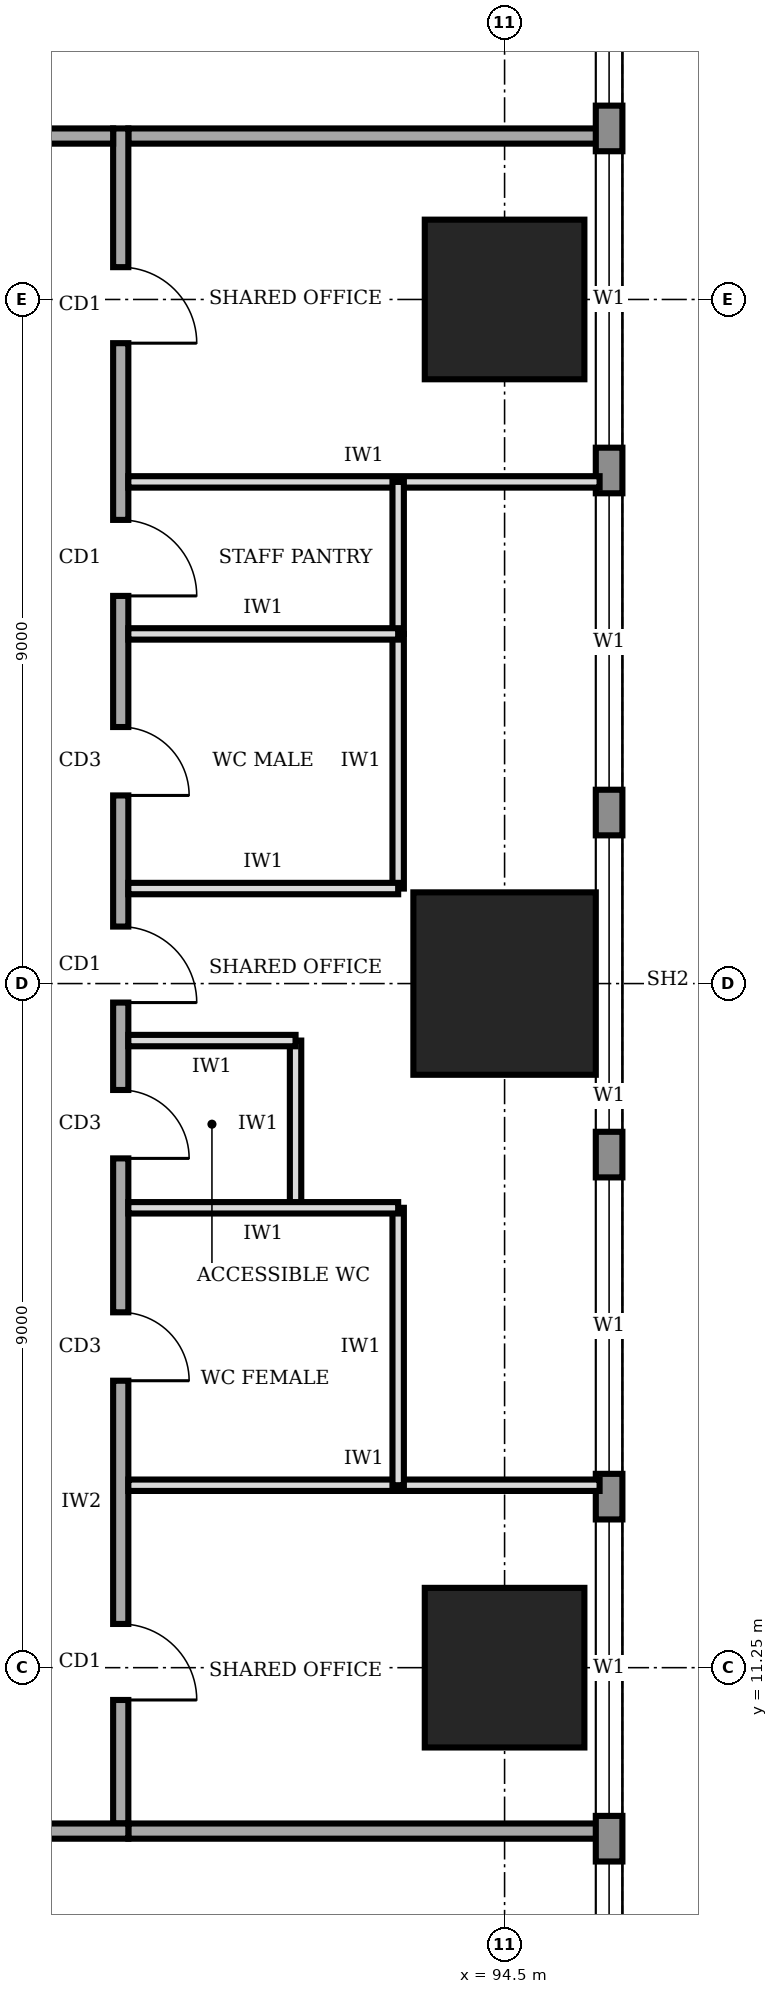
"""IFC4 building model, lengths in metres.
Left out: names, types, materials, properties, quantities, classifications, styles, units other than length and angle.
Written with IfcOpenShell. Run it as: python <this file> out.ifc"""

import sys

from ifc_helpers import new_model, si_unit, direction, frame, frame_2d, origin, origin_2d, place, context, subcontext, project, spatial, rectangle, extrude, element, fill, save


model = new_model("IFC4")
c1 = context("Model", 3, precision=1e-05, world=origin(), true_north=direction((0.0, 1.0)))
c2 = subcontext(c1, "Body", "Model", "MODEL_VIEW")
j1 = project(units=[si_unit("LENGTHUNIT", "METRE"), si_unit("PLANEANGLEUNIT", "RADIAN")], contexts=[c1])
p1 = place(None, origin())
s1 = spatial("IfcSite", under=j1, at=p1, CompositionType="ELEMENT")
p2 = place(p1, origin())
s2 = spatial("IfcBuilding", under=s1, at=p2, CompositionType="ELEMENT")
p3 = place(p2, frame((0.0, 0.0, 125.0)))
s3 = spatial("IfcBuildingStorey", under=s2, at=p3, CompositionType="ELEMENT", Elevation=125.0)
p4 = place(p3, frame((94.5, 11.25, 0.0), z_axis=(0.0, 0.0, 1.0), x_axis=(1.0, 0.0, 0.0)))
e1 = element("IfcColumn", 1, at=p4, inside=s3, PredefinedType="COLUMN", context=c2, shape_type="SweptSolid", body=[
    extrude(rectangle(XDim=2.1, YDim=2.1, at=origin_2d()), origin(), (0.0, 0.0, 1.0), 4.0),
])
p5 = place(p3, frame((94.5, 20.25, 0.0), z_axis=(0.0, 0.0, 1.0), x_axis=(1.0, 0.0, 0.0)))
e2 = element("IfcColumn", 2, at=p5, inside=s3, PredefinedType="COLUMN", context=c2, shape_type="SweptSolid", body=[
    extrude(rectangle(XDim=2.4, YDim=2.4, at=origin_2d()), origin(), (0.0, 0.0, 1.0), 4.0),
])
p6 = place(p3, frame((94.5, 29.25, 0.0), z_axis=(0.0, 0.0, 1.0), x_axis=(1.0, 0.0, 0.0)))
e3 = element("IfcColumn", 3, at=p6, inside=s3, PredefinedType="COLUMN", context=c2, shape_type="SweptSolid", body=[
    extrude(rectangle(XDim=2.1, YDim=2.1, at=origin_2d()), origin(), (0.0, 0.0, 1.0), 4.0),
])
p7 = place(p3, frame((95.875, 3.32, 0.0), z_axis=(0.0, 0.0, 1.0), x_axis=(0.0, 1.0, 0.0)))
e4 = element("IfcWall", 4, at=p7, inside=s3, PredefinedType="STANDARD", context=c2, shape_type="SweptSolid", body=[
    extrude(rectangle(XDim=33.96, YDim=0.35, at=frame_2d((16.98, 0.0))), origin(), (0.0, 0.0, 1.0), 3.75),
])
p8 = place(p7, frame((1.48, 0.0, 0.9)))
e5 = element("IfcOpeningElement", 5, at=p8, cuts=e4, PredefinedType="OPENING", context=c2, shape_type="SweptSolid", body=[
    extrude(rectangle(XDim=3.9, YDim=2.2, at=frame_2d((1.95, 1.1))), frame((0.0, 0.185, 0.0), z_axis=(0.0, -1.0, 0.0), x_axis=(1.0, 0.0, 0.0)), (0.0, 0.0, 1.0), 0.37),
])
p9 = place(p7, frame((5.98, 0.0, 0.9)))
e6 = element("IfcOpeningElement", 6, at=p9, cuts=e4, PredefinedType="OPENING", context=c2, shape_type="SweptSolid", body=[
    extrude(rectangle(XDim=3.9, YDim=2.2, at=frame_2d((1.95, 1.1))), frame((0.0, 0.185, 0.0), z_axis=(0.0, -1.0, 0.0), x_axis=(1.0, 0.0, 0.0)), (0.0, 0.0, 1.0), 0.37),
])
p10 = place(p7, frame((10.48, 0.0, 0.9)))
e7 = element("IfcOpeningElement", 7, at=p10, cuts=e4, PredefinedType="OPENING", context=c2, shape_type="SweptSolid", body=[
    extrude(rectangle(XDim=3.9, YDim=2.2, at=frame_2d((1.95, 1.1))), frame((0.0, 0.185, 0.0), z_axis=(0.0, -1.0, 0.0), x_axis=(1.0, 0.0, 0.0)), (0.0, 0.0, 1.0), 0.37),
])
p11 = place(p7, frame((14.98, 0.0, 0.9)))
e8 = element("IfcOpeningElement", 8, at=p11, cuts=e4, PredefinedType="OPENING", context=c2, shape_type="SweptSolid", body=[
    extrude(rectangle(XDim=3.9, YDim=2.2, at=frame_2d((1.95, 1.1))), frame((0.0, 0.185, 0.0), z_axis=(0.0, -1.0, 0.0), x_axis=(1.0, 0.0, 0.0)), (0.0, 0.0, 1.0), 0.37),
])
p12 = place(p7, frame((19.48, 0.0, 0.9)))
e9 = element("IfcOpeningElement", 9, at=p12, cuts=e4, PredefinedType="OPENING", context=c2, shape_type="SweptSolid", body=[
    extrude(rectangle(XDim=3.9, YDim=2.2, at=frame_2d((1.95, 1.1))), frame((0.0, 0.185, 0.0), z_axis=(0.0, -1.0, 0.0), x_axis=(1.0, 0.0, 0.0)), (0.0, 0.0, 1.0), 0.37),
])
p13 = place(p7, frame((23.98, 0.0, 0.9)))
e10 = element("IfcOpeningElement", 10, at=p13, cuts=e4, PredefinedType="OPENING", context=c2, shape_type="SweptSolid", body=[
    extrude(rectangle(XDim=3.9, YDim=2.2, at=frame_2d((1.95, 1.1))), frame((0.0, 0.185, 0.0), z_axis=(0.0, -1.0, 0.0), x_axis=(1.0, 0.0, 0.0)), (0.0, 0.0, 1.0), 0.37),
])
p14 = place(p7, frame((28.48, 0.0, 0.9)))
e11 = element("IfcOpeningElement", 11, at=p14, cuts=e4, PredefinedType="OPENING", context=c2, shape_type="SweptSolid", body=[
    extrude(rectangle(XDim=3.9, YDim=2.2, at=frame_2d((1.95, 1.1))), frame((0.0, 0.185, 0.0), z_axis=(0.0, -1.0, 0.0), x_axis=(1.0, 0.0, 0.0)), (0.0, 0.0, 1.0), 0.37),
])
p15 = place(p3, frame((71.15, 9.1, 0.0), z_axis=(0.0, 0.0, 1.0), x_axis=(1.0, 0.0, 0.0)))
e12 = element("IfcWall", 12, at=p15, inside=s3, PredefinedType="SOLIDWALL", context=c2, shape_type="SweptSolid", body=[
    extrude(rectangle(XDim=18.4, YDim=0.2, at=frame_2d((9.2, 0.0))), origin(), (0.0, 0.0, 1.0), 3.75),
])
p16 = place(p15, frame((2.075, 0.0, 0.0)))
e13 = element("IfcOpeningElement", 13, at=p16, cuts=e12, PredefinedType="OPENING", context=c2, shape_type="SweptSolid", body=[
    extrude(rectangle(XDim=1.0, YDim=2.1, at=frame_2d((0.5, 1.05))), frame((0.0, 0.11, 0.0), z_axis=(0.0, -1.0, 0.0), x_axis=(1.0, 0.0, 0.0)), (0.0, 0.0, 1.0), 0.22),
])
p17 = place(p15, frame((9.35, 0.0, 0.0)))
e14 = element("IfcOpeningElement", 14, at=p17, cuts=e12, PredefinedType="OPENING", context=c2, shape_type="SweptSolid", body=[
    extrude(rectangle(XDim=1.0, YDim=2.1, at=frame_2d((0.5, 1.05))), frame((0.0, 0.11, 0.0), z_axis=(0.0, -1.0, 0.0), x_axis=(1.0, 0.0, 0.0)), (0.0, 0.0, 1.0), 0.22),
])
p18 = place(p15, frame((15.875, 0.0, 0.0)))
e15 = element("IfcOpeningElement", 15, at=p18, cuts=e12, PredefinedType="OPENING", context=c2, shape_type="SweptSolid", body=[
    extrude(rectangle(XDim=1.0, YDim=2.1, at=frame_2d((0.5, 1.05))), frame((0.0, 0.11, 0.0), z_axis=(0.0, -1.0, 0.0), x_axis=(1.0, 0.0, 0.0)), (0.0, 0.0, 1.0), 0.22),
])
p19 = place(p3, frame((89.45, 9.2, 0.0), z_axis=(0.0, 0.0, 1.0), x_axis=(0.0, 1.0, 0.0)))
e16 = element("IfcWall", 16, at=p19, inside=s3, PredefinedType="SOLIDWALL", context=c2, shape_type="SweptSolid", body=[
    extrude(rectangle(XDim=22.3, YDim=0.2, at=frame_2d((11.15, 0.0))), origin(), (0.0, 0.0, 1.0), 3.75),
])
p20 = place(p19, frame((1.625, 0.0, 0.0)))
e17 = element("IfcOpeningElement", 17, at=p20, cuts=e16, PredefinedType="OPENING", context=c2, shape_type="SweptSolid", body=[
    extrude(rectangle(XDim=1.0, YDim=2.1, at=frame_2d((0.5, 1.05))), frame((0.0, 0.11, 0.0), z_axis=(0.0, -1.0, 0.0), x_axis=(1.0, 0.0, 0.0)), (0.0, 0.0, 1.0), 0.22),
])
p21 = place(p19, frame((5.825, 0.0, 0.0)))
e18 = element("IfcOpeningElement", 18, at=p21, cuts=e16, PredefinedType="OPENING", context=c2, shape_type="SweptSolid", body=[
    extrude(rectangle(XDim=0.9, YDim=2.1, at=frame_2d((0.45, 1.05))), frame((0.0, 0.11, 0.0), z_axis=(0.0, -1.0, 0.0), x_axis=(1.0, 0.0, 0.0)), (0.0, 0.0, 1.0), 0.22),
])
p22 = place(p19, frame((8.75, 0.0, 0.0)))
e19 = element("IfcOpeningElement", 19, at=p22, cuts=e16, PredefinedType="OPENING", context=c2, shape_type="SweptSolid", body=[
    extrude(rectangle(XDim=0.9, YDim=2.1, at=frame_2d((0.45, 1.05))), frame((0.0, 0.11, 0.0), z_axis=(0.0, -1.0, 0.0), x_axis=(1.0, 0.0, 0.0)), (0.0, 0.0, 1.0), 0.22),
])
p23 = place(p19, frame((13.525, 0.0, 0.0)))
e20 = element("IfcOpeningElement", 20, at=p23, cuts=e16, PredefinedType="OPENING", context=c2, shape_type="SweptSolid", body=[
    extrude(rectangle(XDim=0.9, YDim=2.1, at=frame_2d((0.45, 1.05))), frame((0.0, 0.11, 0.0), z_axis=(0.0, -1.0, 0.0), x_axis=(1.0, 0.0, 0.0)), (0.0, 0.0, 1.0), 0.22),
])
p24 = place(p19, frame((16.15, 0.0, 0.0)))
e21 = element("IfcOpeningElement", 21, at=p24, cuts=e16, PredefinedType="OPENING", context=c2, shape_type="SweptSolid", body=[
    extrude(rectangle(XDim=1.0, YDim=2.1, at=frame_2d((0.5, 1.05))), frame((0.0, 0.11, 0.0), z_axis=(0.0, -1.0, 0.0), x_axis=(1.0, 0.0, 0.0)), (0.0, 0.0, 1.0), 0.22),
])
p25 = place(p19, frame((10.8, 0.0, 0.0)))
e22 = element("IfcOpeningElement", 22, at=p25, cuts=e16, PredefinedType="OPENING", context=c2, shape_type="SweptSolid", body=[
    extrude(rectangle(XDim=1.0, YDim=2.1, at=frame_2d((0.5, 1.05))), frame((0.0, 0.11, 0.0), z_axis=(0.0, -1.0, 0.0), x_axis=(1.0, 0.0, 0.0)), (0.0, 0.0, 1.0), 0.22),
])
p26 = place(p19, frame((19.475, 0.0, 0.0)))
e23 = element("IfcOpeningElement", 23, at=p26, cuts=e16, PredefinedType="OPENING", context=c2, shape_type="SweptSolid", body=[
    extrude(rectangle(XDim=1.0, YDim=2.1, at=frame_2d((0.5, 1.05))), frame((0.0, 0.11, 0.0), z_axis=(0.0, -1.0, 0.0), x_axis=(1.0, 0.0, 0.0)), (0.0, 0.0, 1.0), 0.22),
])
p27 = place(p3, frame((89.35, 31.4, 0.0), z_axis=(0.0, 0.0, 1.0), x_axis=(-1.0, 0.0, 0.0)))
e24 = element("IfcWall", 24, at=p27, inside=s3, PredefinedType="SOLIDWALL", context=c2, shape_type="SweptSolid", body=[
    extrude(rectangle(XDim=18.4, YDim=0.2, at=frame_2d((9.2, 0.0))), origin(), (0.0, 0.0, 1.0), 3.75),
])
p28 = place(p27, frame((14.725, 0.0, 0.0)))
e25 = element("IfcOpeningElement", 25, at=p28, cuts=e24, PredefinedType="OPENING", context=c2, shape_type="SweptSolid", body=[
    extrude(rectangle(XDim=1.8, YDim=2.1, at=frame_2d((0.9, 1.05))), frame((0.0, 0.11, 0.0), z_axis=(0.0, -1.0, 0.0), x_axis=(1.0, 0.0, 0.0)), (0.0, 0.0, 1.0), 0.22),
])
p29 = place(p27, frame((7.85, 0.0, 0.0)))
e26 = element("IfcOpeningElement", 26, at=p29, cuts=e24, PredefinedType="OPENING", context=c2, shape_type="SweptSolid", body=[
    extrude(rectangle(XDim=1.0, YDim=2.1, at=frame_2d((0.5, 1.05))), frame((0.0, 0.11, 0.0), z_axis=(0.0, -1.0, 0.0), x_axis=(1.0, 0.0, 0.0)), (0.0, 0.0, 1.0), 0.22),
])
p30 = place(p27, frame((1.325, 0.0, 0.0)))
e27 = element("IfcOpeningElement", 27, at=p30, cuts=e24, PredefinedType="OPENING", context=c2, shape_type="SweptSolid", body=[
    extrude(rectangle(XDim=1.0, YDim=2.1, at=frame_2d((0.5, 1.05))), frame((0.0, 0.11, 0.0), z_axis=(0.0, -1.0, 0.0), x_axis=(1.0, 0.0, 0.0)), (0.0, 0.0, 1.0), 0.22),
])
for number, where, z_axis, x_axis in (
    (28, (89.55, 9.1, 0.0), (0.0, 0.0, 1.0), (1.0, 0.0, 0.0)),
    (29, (89.55, 31.4, 0.0), (0.0, 0.0, 1.0), (1.0, 0.0, 0.0)),
):
    element("IfcWall", number, at=place(p3, frame(where, z_axis=z_axis, x_axis=x_axis)), inside=s3, PredefinedType="SOLIDWALL", context=c2, shape_type="SweptSolid", body=[
        extrude(rectangle(XDim=6.2, YDim=0.2, at=frame_2d((3.1, 0.0))), origin(), (0.0, 0.0, 1.0), 3.75),
    ])
for number, where, z_axis, x_axis in (
    (30, (89.55, 13.65, 0.0), (0.0, 0.0, 1.0), (1.0, 0.0, 0.0)),
    (31, (89.55, 26.85, 0.0), (0.0, 0.0, 1.0), (1.0, 0.0, 0.0)),
):
    element("IfcWall", number, at=place(p3, frame(where, z_axis=z_axis, x_axis=x_axis)), inside=s3, PredefinedType="PARTITIONING", context=c2, shape_type="SweptSolid", body=[
        extrude(rectangle(XDim=6.2, YDim=0.15, at=frame_2d((3.1, 0.0))), origin(), (0.0, 0.0, 1.0), 3.75),
    ])
p31 = place(p3, frame((89.55, 17.3, 0.0), z_axis=(0.0, 0.0, 1.0), x_axis=(1.0, 0.0, 0.0)))
e32 = element("IfcWall", 32, at=p31, inside=s3, PredefinedType="PARTITIONING", context=c2, shape_type="SweptSolid", body=[
    extrude(rectangle(XDim=3.55, YDim=0.15, at=frame_2d((1.775, 0.0))), origin(), (0.0, 0.0, 1.0), 3.75),
])
p32 = place(p3, frame((89.55, 19.5, 0.0), z_axis=(0.0, 0.0, 1.0), x_axis=(1.0, 0.0, 0.0)))
e33 = element("IfcWall", 33, at=p32, inside=s3, PredefinedType="PARTITIONING", context=c2, shape_type="SweptSolid", body=[
    extrude(rectangle(XDim=2.2, YDim=0.15, at=frame_2d((1.1, 0.0))), origin(), (0.0, 0.0, 1.0), 2.85),
])
for number, where, z_axis, x_axis in (
    (34, (89.55, 21.5, 0.0), (0.0, 0.0, 1.0), (1.0, 0.0, 0.0)),
    (35, (89.55, 24.85, 0.0), (0.0, 0.0, 1.0), (1.0, 0.0, 0.0)),
):
    element("IfcWall", number, at=place(p3, frame(where, z_axis=z_axis, x_axis=x_axis)), inside=s3, PredefinedType="PARTITIONING", context=c2, shape_type="SweptSolid", body=[
        extrude(rectangle(XDim=3.55, YDim=0.15, at=frame_2d((1.775, 0.0))), origin(), (0.0, 0.0, 1.0), 3.75),
    ])
p33 = place(p3, frame((93.1, 13.65, 0.0), z_axis=(0.0, 0.0, 1.0), x_axis=(0.0, 1.0, 0.0)))
e36 = element("IfcWall", 36, at=p33, inside=s3, PredefinedType="PARTITIONING", context=c2, shape_type="SweptSolid", body=[
    extrude(rectangle(XDim=3.65, YDim=0.15, at=frame_2d((1.825, 0.0))), origin(), (0.0, 0.0, 1.0), 3.75),
])
p34 = place(p3, frame((91.75, 17.3, 0.0), z_axis=(0.0, 0.0, 1.0), x_axis=(0.0, 1.0, 0.0)))
e37 = element("IfcWall", 37, at=p34, inside=s3, PredefinedType="PARTITIONING", context=c2, shape_type="SweptSolid", body=[
    extrude(rectangle(XDim=2.2, YDim=0.15, at=frame_2d((1.1, 0.0))), origin(), (0.0, 0.0, 1.0), 3.75),
])
p35 = place(p3, frame((93.1, 21.5, 0.0), z_axis=(0.0, 0.0, 1.0), x_axis=(0.0, 1.0, 0.0)))
e38 = element("IfcWall", 38, at=p35, inside=s3, PredefinedType="PARTITIONING", context=c2, shape_type="SweptSolid", body=[
    extrude(rectangle(XDim=3.35, YDim=0.15, at=frame_2d((1.675, 0.0))), origin(), (0.0, 0.0, 1.0), 3.75),
])
p36 = place(p3, frame((93.1, 24.85, 0.0), z_axis=(0.0, 0.0, 1.0), x_axis=(0.0, 1.0, 0.0)))
e39 = element("IfcWall", 39, at=p36, inside=s3, PredefinedType="PARTITIONING", context=c2, shape_type="SweptSolid", body=[
    extrude(rectangle(XDim=2.0, YDim=0.15, at=frame_2d((1.0, 0.0))), origin(), (0.0, 0.0, 1.0), 3.75),
])
p37 = place(p8, origin())
e40 = element("IfcWindow", 40, at=p37, inside=s3, PartitioningType="SINGLE_PANEL", PredefinedType="WINDOW", context=c2, shape_type="SweptSolid", body=[
    extrude(rectangle(XDim=3.9, YDim=2.2, at=frame_2d((1.95, 1.1))), frame((0.0, 0.03, 0.0), z_axis=(0.0, -1.0, 0.0), x_axis=(1.0, 0.0, 0.0)), (0.0, 0.0, 1.0), 0.06),
])
fill(e5, e40)
p38 = place(p9, origin())
e41 = element("IfcWindow", 41, at=p38, inside=s3, PartitioningType="SINGLE_PANEL", PredefinedType="WINDOW", context=c2, shape_type="SweptSolid", body=[
    extrude(rectangle(XDim=3.9, YDim=2.2, at=frame_2d((1.95, 1.1))), frame((0.0, 0.03, 0.0), z_axis=(0.0, -1.0, 0.0), x_axis=(1.0, 0.0, 0.0)), (0.0, 0.0, 1.0), 0.06),
])
fill(e6, e41)
p39 = place(p10, origin())
e42 = element("IfcWindow", 42, at=p39, inside=s3, PartitioningType="SINGLE_PANEL", PredefinedType="WINDOW", context=c2, shape_type="SweptSolid", body=[
    extrude(rectangle(XDim=3.9, YDim=2.2, at=frame_2d((1.95, 1.1))), frame((0.0, 0.03, 0.0), z_axis=(0.0, -1.0, 0.0), x_axis=(1.0, 0.0, 0.0)), (0.0, 0.0, 1.0), 0.06),
])
fill(e7, e42)
p40 = place(p11, origin())
e43 = element("IfcWindow", 43, at=p40, inside=s3, PartitioningType="SINGLE_PANEL", PredefinedType="WINDOW", context=c2, shape_type="SweptSolid", body=[
    extrude(rectangle(XDim=3.9, YDim=2.2, at=frame_2d((1.95, 1.1))), frame((0.0, 0.03, 0.0), z_axis=(0.0, -1.0, 0.0), x_axis=(1.0, 0.0, 0.0)), (0.0, 0.0, 1.0), 0.06),
])
fill(e8, e43)
p41 = place(p12, origin())
e44 = element("IfcWindow", 44, at=p41, inside=s3, PartitioningType="SINGLE_PANEL", PredefinedType="WINDOW", context=c2, shape_type="SweptSolid", body=[
    extrude(rectangle(XDim=3.9, YDim=2.2, at=frame_2d((1.95, 1.1))), frame((0.0, 0.03, 0.0), z_axis=(0.0, -1.0, 0.0), x_axis=(1.0, 0.0, 0.0)), (0.0, 0.0, 1.0), 0.06),
])
fill(e9, e44)
p42 = place(p13, origin())
e45 = element("IfcWindow", 45, at=p42, inside=s3, PartitioningType="SINGLE_PANEL", PredefinedType="WINDOW", context=c2, shape_type="SweptSolid", body=[
    extrude(rectangle(XDim=3.9, YDim=2.2, at=frame_2d((1.95, 1.1))), frame((0.0, 0.03, 0.0), z_axis=(0.0, -1.0, 0.0), x_axis=(1.0, 0.0, 0.0)), (0.0, 0.0, 1.0), 0.06),
])
fill(e10, e45)
p43 = place(p14, origin())
e46 = element("IfcWindow", 46, at=p43, inside=s3, PartitioningType="SINGLE_PANEL", PredefinedType="WINDOW", context=c2, shape_type="SweptSolid", body=[
    extrude(rectangle(XDim=3.9, YDim=2.2, at=frame_2d((1.95, 1.1))), frame((0.0, 0.03, 0.0), z_axis=(0.0, -1.0, 0.0), x_axis=(1.0, 0.0, 0.0)), (0.0, 0.0, 1.0), 0.06),
])
fill(e11, e46)
p44 = place(p20, frame((1.0, 0.0, 0.0), z_axis=(0.0, 0.0, 1.0), x_axis=(-1.0, 0.0, 0.0)))
e47 = element("IfcDoor", 47, at=p44, inside=s3, OperationType="SINGLE_SWING_RIGHT", PredefinedType="DOOR", context=c2, shape_type="SweptSolid", body=[
    extrude(rectangle(XDim=1.0, YDim=2.1, at=frame_2d((0.5, 1.05))), frame((0.0, 0.025, 0.0), z_axis=(0.0, -1.0, 0.0), x_axis=(1.0, 0.0, 0.0)), (0.0, 0.0, 1.0), 0.05),
])
fill(e17, e47)
p45 = place(p21, frame((0.9, 0.0, 0.0), z_axis=(0.0, 0.0, 1.0), x_axis=(-1.0, 0.0, 0.0)))
e48 = element("IfcDoor", 48, at=p45, inside=s3, OperationType="SINGLE_SWING_RIGHT", PredefinedType="DOOR", context=c2, shape_type="SweptSolid", body=[
    extrude(rectangle(XDim=0.9, YDim=2.1, at=frame_2d((0.45, 1.05))), frame((0.0, 0.025, 0.0), z_axis=(0.0, -1.0, 0.0), x_axis=(1.0, 0.0, 0.0)), (0.0, 0.0, 1.0), 0.05),
])
fill(e18, e48)
p46 = place(p22, frame((0.9, 0.0, 0.0), z_axis=(0.0, 0.0, 1.0), x_axis=(-1.0, 0.0, 0.0)))
e49 = element("IfcDoor", 49, at=p46, inside=s3, OperationType="SINGLE_SWING_RIGHT", PredefinedType="DOOR", context=c2, shape_type="SweptSolid", body=[
    extrude(rectangle(XDim=0.9, YDim=2.1, at=frame_2d((0.45, 1.05))), frame((0.0, 0.025, 0.0), z_axis=(0.0, -1.0, 0.0), x_axis=(1.0, 0.0, 0.0)), (0.0, 0.0, 1.0), 0.05),
])
fill(e19, e49)
p47 = place(p23, frame((0.9, 0.0, 0.0), z_axis=(0.0, 0.0, 1.0), x_axis=(-1.0, 0.0, 0.0)))
e50 = element("IfcDoor", 50, at=p47, inside=s3, OperationType="SINGLE_SWING_RIGHT", PredefinedType="DOOR", context=c2, shape_type="SweptSolid", body=[
    extrude(rectangle(XDim=0.9, YDim=2.1, at=frame_2d((0.45, 1.05))), frame((0.0, 0.025, 0.0), z_axis=(0.0, -1.0, 0.0), x_axis=(1.0, 0.0, 0.0)), (0.0, 0.0, 1.0), 0.05),
])
fill(e20, e50)
p48 = place(p24, frame((1.0, 0.0, 0.0), z_axis=(0.0, 0.0, 1.0), x_axis=(-1.0, 0.0, 0.0)))
e51 = element("IfcDoor", 51, at=p48, inside=s3, OperationType="SINGLE_SWING_RIGHT", PredefinedType="DOOR", context=c2, shape_type="SweptSolid", body=[
    extrude(rectangle(XDim=1.0, YDim=2.1, at=frame_2d((0.5, 1.05))), frame((0.0, 0.025, 0.0), z_axis=(0.0, -1.0, 0.0), x_axis=(1.0, 0.0, 0.0)), (0.0, 0.0, 1.0), 0.05),
])
fill(e21, e51)
p49 = place(p25, frame((1.0, 0.0, 0.0), z_axis=(0.0, 0.0, 1.0), x_axis=(-1.0, 0.0, 0.0)))
e52 = element("IfcDoor", 52, at=p49, inside=s3, OperationType="SINGLE_SWING_RIGHT", PredefinedType="DOOR", context=c2, shape_type="SweptSolid", body=[
    extrude(rectangle(XDim=1.0, YDim=2.1, at=frame_2d((0.5, 1.05))), frame((0.0, 0.025, 0.0), z_axis=(0.0, -1.0, 0.0), x_axis=(1.0, 0.0, 0.0)), (0.0, 0.0, 1.0), 0.05),
])
fill(e22, e52)
p50 = place(p26, frame((1.0, 0.0, 0.0), z_axis=(0.0, 0.0, 1.0), x_axis=(-1.0, 0.0, 0.0)))
e53 = element("IfcDoor", 53, at=p50, inside=s3, OperationType="SINGLE_SWING_RIGHT", PredefinedType="DOOR", context=c2, shape_type="SweptSolid", body=[
    extrude(rectangle(XDim=1.0, YDim=2.1, at=frame_2d((0.5, 1.05))), frame((0.0, 0.025, 0.0), z_axis=(0.0, -1.0, 0.0), x_axis=(1.0, 0.0, 0.0)), (0.0, 0.0, 1.0), 0.05),
])
fill(e23, e53)
save(model, sys.argv[1])
